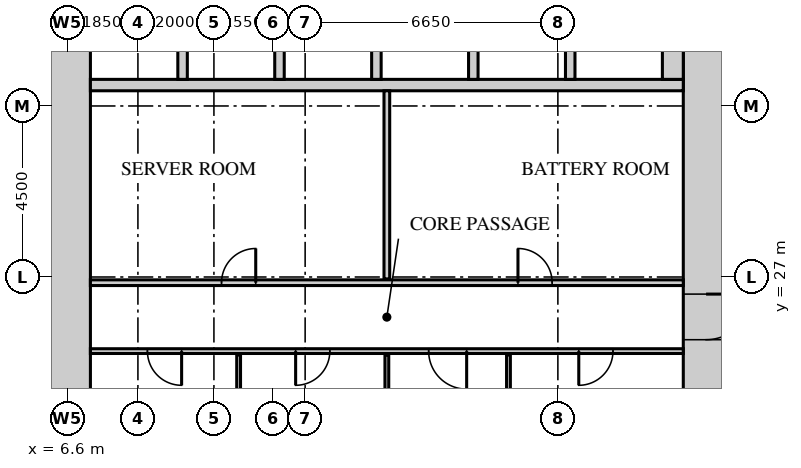
"""IFC4 building model, lengths in metres.
Left out: names, types, materials, properties, quantities, classifications, styles, units other than length and angle.
Written with IfcOpenShell. Run it as: python <this file> out.ifc"""

import sys

from ifc_helpers import new_model, si_unit, direction, frame, frame_2d, origin, place, context, subcontext, project, spatial, rectangle, extrude, source, transform, mapped, element, fill, save


model = new_model("IFC4")
c1 = context("Model", 3, precision=1e-05, world=origin(), true_north=direction((0.0, 1.0)))
c2 = subcontext(c1, "Body", "Model", "MODEL_VIEW")
j1 = project(units=[si_unit("LENGTHUNIT", "METRE"), si_unit("PLANEANGLEUNIT", "RADIAN")], contexts=[c1])
p1 = place(None, origin())
s1 = spatial("IfcSite", under=j1, at=p1, CompositionType="ELEMENT")
p2 = place(p1, origin())
s2 = spatial("IfcBuilding", under=s1, at=p2, CompositionType="ELEMENT")
p3 = place(p2, frame((0.0, 0.0, -9.0)))
s3 = spatial("IfcBuildingStorey", under=s2, at=p3, CompositionType="ELEMENT", Elevation=-9.0)
m1 = source(origin(), c2, "Body", "SweptSolid", [
    extrude(rectangle(XDim=27.6, YDim=1.2, at=frame_2d((13.8, 0.0))), origin(), (0.0, 0.0, 1.0), 4.2),
])
p4 = place(p3, frame((23.4, 13.2, 0.0), z_axis=(0.0, 0.0, 1.0), x_axis=(0.0, 1.0, 0.0)))
e1 = element("IfcWall", 1, at=p4, inside=s3, PredefinedType="SHEAR", context=c2, shape_type="MappedRepresentation", body=[
    mapped(m1, transform((0.0, 0.0, 0.0))),
])
m2 = source(origin(), c2, "Body", "SweptSolid", [
    extrude(rectangle(XDim=1.2, YDim=2.1, at=frame_2d((0.6, 1.05))), frame((0.0, 0.61, 0.0), z_axis=(0.0, -1.0, 0.0), x_axis=(1.0, 0.0, 0.0)), (0.0, 0.0, 1.0), 1.22),
])
p5 = place(p4, frame((12.15, 0.0, 0.0)))
e2 = element("IfcOpeningElement", 2, at=p5, cuts=e1, PredefinedType="OPENING", context=c2, shape_type="MappedRepresentation", body=[
    mapped(m2, transform((0.0, 0.0, 0.0))),
])
m3 = source(origin(), c2, "Body", "SweptSolid", [
    extrude(rectangle(XDim=0.9, YDim=2.1, at=frame_2d((0.45, 1.05))), frame((0.0, 0.61, 0.0), z_axis=(0.0, -1.0, 0.0), x_axis=(1.0, 0.0, 0.0)), (0.0, 0.0, 1.0), 1.22),
])
p6 = place(p4, frame((4.4, 0.0, 0.0)))
e3 = element("IfcOpeningElement", 3, at=p6, cuts=e1, PredefinedType="OPENING", context=c2, shape_type="MappedRepresentation", body=[
    mapped(m3, transform((0.0, 0.0, 0.0))),
])
p7 = place(p3, frame((6.6, 13.2, 0.0), z_axis=(0.0, 0.0, 1.0), x_axis=(0.0, 1.0, 0.0)))
e4 = element("IfcWall", 4, at=p7, inside=s3, PredefinedType="SHEAR", context=c2, shape_type="MappedRepresentation", body=[
    mapped(m1, transform((0.0, 0.0, 0.0))),
])
m4 = source(origin(), c2, "Body", "SweptSolid", [
    extrude(rectangle(XDim=15.6, YDim=0.3, at=frame_2d((7.8, 0.0))), origin(), (0.0, 0.0, 1.0), 4.2),
])
p8 = place(p3, frame((7.2, 32.05, 0.0), z_axis=(0.0, 0.0, 1.0), x_axis=(1.0, 0.0, 0.0)))
e5 = element("IfcWall", 5, at=p8, inside=s3, PredefinedType="STANDARD", context=c2, shape_type="MappedRepresentation", body=[
    mapped(m4, transform((0.0, 0.0, 0.0))),
])
m5 = source(origin(), c2, "Body", "SweptSolid", [
    extrude(rectangle(XDim=2.4, YDim=0.25, at=frame_2d((1.2, 0.0))), origin(), (0.0, 0.0, 1.0), 4.2),
])
for number, where, z_axis, x_axis in (
    (6, (9.625, 32.2, 0.0), (0.0, 0.0, 1.0), (0.0, 1.0, 0.0)),
    (7, (12.175, 32.2, 0.0), (0.0, 0.0, 1.0), (0.0, 1.0, 0.0)),
    (8, (14.725, 32.2, 0.0), (0.0, 0.0, 1.0), (0.0, 1.0, 0.0)),
    (9, (17.275, 32.2, 0.0), (0.0, 0.0, 1.0), (0.0, 1.0, 0.0)),
    (10, (19.825, 32.2, 0.0), (0.0, 0.0, 1.0), (0.0, 1.0, 0.0)),
):
    element("IfcWall", number, at=place(p3, frame(where, z_axis=z_axis, x_axis=x_axis)), inside=s3, PredefinedType="STANDARD", context=c2, shape_type="MappedRepresentation", body=[
        mapped(m5, transform((0.0, 0.0, 0.0))),
    ])
m6 = source(origin(), c2, "Body", "SweptSolid", [
    extrude(rectangle(XDim=2.4, YDim=0.55, at=frame_2d((1.2, 0.0))), origin(), (0.0, 0.0, 1.0), 4.2),
])
p9 = place(p3, frame((22.525, 32.2, 0.0), z_axis=(0.0, 0.0, 1.0), x_axis=(0.0, 1.0, 0.0)))
e11 = element("IfcWall", 11, at=p9, inside=s3, PredefinedType="STANDARD", context=c2, shape_type="MappedRepresentation", body=[
    mapped(m6, transform((0.0, 0.0, 0.0))),
])
m7 = source(origin(), c2, "Body", "SweptSolid", [
    extrude(rectangle(XDim=2.05, YDim=0.1, at=frame_2d((1.025, 0.0))), origin(), (0.0, 0.0, 1.0), 4.2),
])
for number, where, z_axis, x_axis in (
    (12, (11.1, 22.9, 0.0), (0.0, 0.0, 1.0), (0.0, 1.0, 0.0)),
    (13, (15.0, 22.9, 0.0), (0.0, 0.0, 1.0), (0.0, 1.0, 0.0)),
):
    element("IfcWall", number, at=place(p3, frame(where, z_axis=z_axis, x_axis=x_axis)), inside=s3, PredefinedType="PARTITIONING", context=c2, shape_type="MappedRepresentation", body=[
        mapped(m7, transform((0.0, 0.0, 0.0))),
    ])
m8 = source(origin(), c2, "Body", "SweptSolid", [
    extrude(rectangle(XDim=2.0, YDim=0.1, at=frame_2d((1.0, 0.0))), origin(), (0.0, 0.0, 1.0), 4.2),
])
p10 = place(p3, frame((18.2, 22.95, 0.0), z_axis=(0.0, 0.0, 1.0), x_axis=(0.0, 1.0, 0.0)))
e14 = element("IfcWall", 14, at=p10, inside=s3, PredefinedType="PARTITIONING", context=c2, shape_type="MappedRepresentation", body=[
    mapped(m8, transform((0.0, 0.0, 0.0))),
])
m9 = source(origin(), c2, "Body", "SweptSolid", [
    extrude(rectangle(XDim=15.6, YDim=0.125, at=frame_2d((7.8, 0.0))), origin(), (0.0, 0.0, 1.0), 4.2),
])
p11 = place(p3, frame((7.2, 25.05, 0.0), z_axis=(0.0, 0.0, 1.0), x_axis=(1.0, 0.0, 0.0)))
e15 = element("IfcWall", 15, at=p11, inside=s3, PredefinedType="PARTITIONING", context=c2, shape_type="MappedRepresentation", body=[
    mapped(m9, transform((0.0, 0.0, 0.0))),
])
m10 = source(origin(), c2, "Body", "SweptSolid", [
    extrude(rectangle(XDim=0.9, YDim=2.1, at=frame_2d((0.45, 1.05))), frame((0.0, 0.073, 0.0), z_axis=(0.0, -1.0, 0.0), x_axis=(1.0, 0.0, 0.0)), (0.0, 0.0, 1.0), 0.145),
])
p12 = place(p11, frame((1.5, 0.0, 0.0)))
e16 = element("IfcOpeningElement", 16, at=p12, cuts=e15, PredefinedType="OPENING", context=c2, shape_type="MappedRepresentation", body=[
    mapped(m10, transform((0.0, 0.0, 0.0))),
])
p13 = place(p11, frame((5.4, 0.0, 0.0)))
e17 = element("IfcOpeningElement", 17, at=p13, cuts=e15, PredefinedType="OPENING", context=c2, shape_type="MappedRepresentation", body=[
    mapped(m10, transform((0.0, 0.0, 0.0))),
])
m11 = source(origin(), c2, "Body", "SweptSolid", [
    extrude(rectangle(XDim=1.0, YDim=2.1, at=frame_2d((0.5, 1.05))), frame((0.0, 0.073, 0.0), z_axis=(0.0, -1.0, 0.0), x_axis=(1.0, 0.0, 0.0)), (0.0, 0.0, 1.0), 0.145),
])
p14 = place(p11, frame((8.9, 0.0, 0.0)))
e18 = element("IfcOpeningElement", 18, at=p14, cuts=e15, PredefinedType="OPENING", context=c2, shape_type="MappedRepresentation", body=[
    mapped(m11, transform((0.0, 0.0, 0.0))),
])
p15 = place(p11, frame((12.85, 0.0, 0.0)))
e19 = element("IfcOpeningElement", 19, at=p15, cuts=e15, PredefinedType="OPENING", context=c2, shape_type="MappedRepresentation", body=[
    mapped(m10, transform((0.0, 0.0, 0.0))),
])
m12 = source(origin(), c2, "Body", "SweptSolid", [
    extrude(rectangle(XDim=15.6, YDim=0.15, at=frame_2d((7.8, 0.0))), origin(), (0.0, 0.0, 1.0), 4.2),
])
p16 = place(p3, frame((7.2, 26.85, 0.0), z_axis=(0.0, 0.0, 1.0), x_axis=(1.0, 0.0, 0.0)))
e20 = element("IfcWall", 20, at=p16, inside=s3, PredefinedType="PARTITIONING", context=c2, shape_type="MappedRepresentation", body=[
    mapped(m12, transform((0.0, 0.0, 0.0))),
])
m13 = source(origin(), c2, "Body", "SweptSolid", [
    extrude(rectangle(XDim=0.9, YDim=2.1, at=frame_2d((0.45, 1.05))), frame((0.0, 0.085, 0.0), z_axis=(0.0, -1.0, 0.0), x_axis=(1.0, 0.0, 0.0)), (0.0, 0.0, 1.0), 0.17),
])
p17 = place(p16, frame((3.45, 0.0, 0.0)))
e21 = element("IfcOpeningElement", 21, at=p17, cuts=e20, PredefinedType="OPENING", context=c2, shape_type="MappedRepresentation", body=[
    mapped(m13, transform((0.0, 0.0, 0.0))),
])
p18 = place(p16, frame((11.25, 0.0, 0.0)))
e22 = element("IfcOpeningElement", 22, at=p18, cuts=e20, PredefinedType="OPENING", context=c2, shape_type="MappedRepresentation", body=[
    mapped(m13, transform((0.0, 0.0, 0.0))),
])
m14 = source(origin(), c2, "Body", "SweptSolid", [
    extrude(rectangle(XDim=4.95, YDim=0.15, at=frame_2d((2.475, 0.0))), origin(), (0.0, 0.0, 1.0), 4.2),
])
p19 = place(p3, frame((15.0, 26.95, 0.0), z_axis=(0.0, 0.0, 1.0), x_axis=(0.0, 1.0, 0.0)))
e23 = element("IfcWall", 23, at=p19, inside=s3, PredefinedType="PARTITIONING", context=c2, shape_type="MappedRepresentation", body=[
    mapped(m14, transform((0.0, 0.0, 0.0))),
])
m15 = source(origin(), c2, "Body", "SweptSolid", [
    extrude(rectangle(XDim=1.2, YDim=2.1, at=frame_2d((0.6, 1.05))), frame((0.0, 0.55, 0.0), z_axis=(0.0, -1.0, 0.0), x_axis=(1.0, 0.0, 0.0)), (0.0, 0.0, 1.0), 1.1),
])
p20 = place(p5, origin())
e24 = element("IfcDoor", 24, at=p20, inside=s3, OperationType="SINGLE_SWING_RIGHT", PredefinedType="DOOR", context=c2, shape_type="MappedRepresentation", body=[
    mapped(m15, transform((0.0, 0.0, 0.0))),
])
fill(e2, e24)
m16 = source(origin(), c2, "Body", "SweptSolid", [
    extrude(rectangle(XDim=0.9, YDim=2.1, at=frame_2d((0.45, 1.05))), frame((0.0, 0.025, 0.0), z_axis=(0.0, -1.0, 0.0), x_axis=(1.0, 0.0, 0.0)), (0.0, 0.0, 1.0), 0.05),
])
p21 = place(p17, origin())
e25 = element("IfcDoor", 25, at=p21, inside=s3, OperationType="SINGLE_SWING_LEFT", PredefinedType="DOOR", context=c2, shape_type="MappedRepresentation", body=[
    mapped(m16, transform((0.0, 0.0, 0.0))),
])
fill(e21, e25)
p22 = place(p18, origin())
e26 = element("IfcDoor", 26, at=p22, inside=s3, OperationType="SINGLE_SWING_RIGHT", PredefinedType="DOOR", context=c2, shape_type="MappedRepresentation", body=[
    mapped(m16, transform((0.0, 0.0, 0.0))),
])
fill(e22, e26)
p23 = place(p12, origin())
e27 = element("IfcDoor", 27, at=p23, inside=s3, OperationType="SINGLE_SWING_RIGHT", PredefinedType="DOOR", context=c2, shape_type="MappedRepresentation", body=[
    mapped(m16, transform((0.0, 0.0, 0.0))),
])
fill(e16, e27)
p24 = place(p13, origin())
e28 = element("IfcDoor", 28, at=p24, inside=s3, OperationType="SINGLE_SWING_LEFT", PredefinedType="DOOR", context=c2, shape_type="MappedRepresentation", body=[
    mapped(m16, transform((0.0, 0.0, 0.0))),
])
fill(e17, e28)
m17 = source(origin(), c2, "Body", "SweptSolid", [
    extrude(rectangle(XDim=1.0, YDim=2.1, at=frame_2d((0.5, 1.05))), frame((0.0, 0.025, 0.0), z_axis=(0.0, -1.0, 0.0), x_axis=(1.0, 0.0, 0.0)), (0.0, 0.0, 1.0), 0.05),
])
p25 = place(p14, origin())
e29 = element("IfcDoor", 29, at=p25, inside=s3, OperationType="SINGLE_SWING_RIGHT", PredefinedType="DOOR", context=c2, shape_type="MappedRepresentation", body=[
    mapped(m17, transform((0.0, 0.0, 0.0))),
])
fill(e18, e29)
p26 = place(p15, origin())
e30 = element("IfcDoor", 30, at=p26, inside=s3, OperationType="SINGLE_SWING_LEFT", PredefinedType="DOOR", context=c2, shape_type="MappedRepresentation", body=[
    mapped(m16, transform((0.0, 0.0, 0.0))),
])
fill(e19, e30)
save(model, sys.argv[1])
